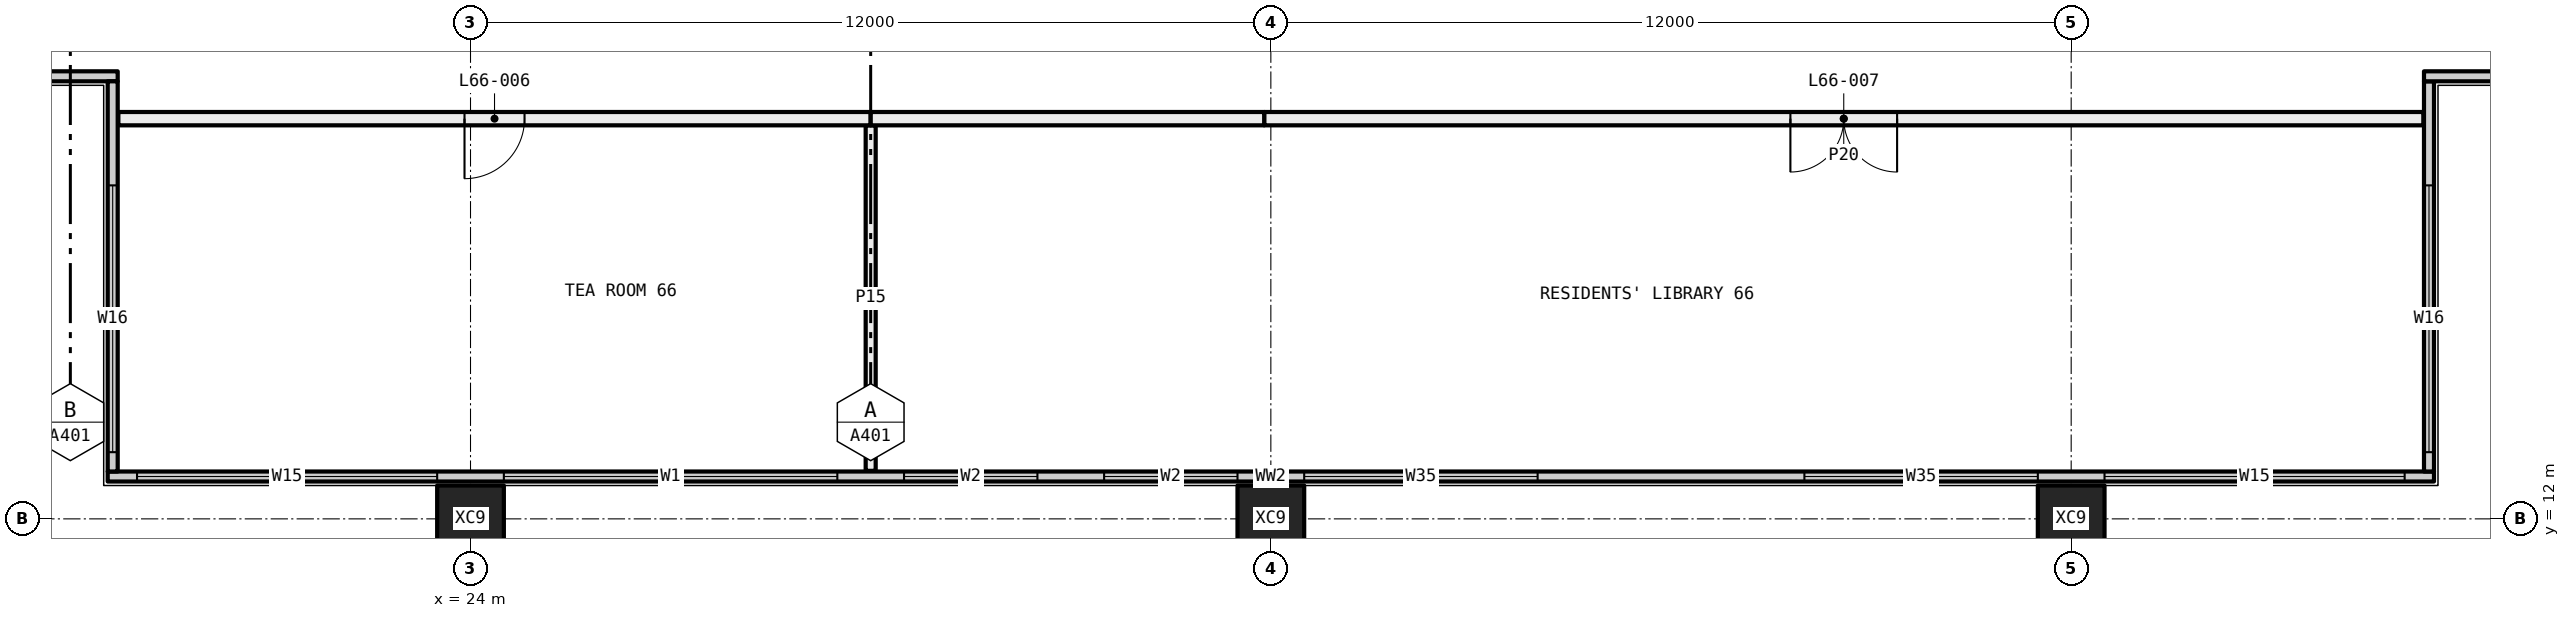
"""IFC4 building model, lengths in metres.
Left out: names, types, materials, properties, quantities, classifications, styles, units other than length and angle.
Written with IfcOpenShell. Run it as: python <this file> out.ifc"""

import sys

from ifc_helpers import new_model, si_unit, direction, frame, frame_2d, origin, origin_2d, place, context, subcontext, project, spatial, rectangle, hollow_rectangle, extrude, element, fill, save


model = new_model("IFC4")
c1 = context("Model", 3, precision=1e-05, world=origin(), true_north=direction((0.0, 1.0)))
c2 = subcontext(c1, "Body", "Model", "MODEL_VIEW")
j1 = project(units=[si_unit("LENGTHUNIT", "METRE"), si_unit("PLANEANGLEUNIT", "RADIAN")], contexts=[c1])
p1 = place(None, origin())
s1 = spatial("IfcSite", under=j1, at=p1, CompositionType="ELEMENT")
p2 = place(p1, origin())
s2 = spatial("IfcBuilding", under=s1, at=p2, CompositionType="ELEMENT")
p3 = place(p2, frame((0.0, 0.0, 245.55)))
s3 = spatial("IfcBuildingStorey", under=s2, at=p3, CompositionType="ELEMENT", Elevation=245.55)
for number, where, z_axis, x_axis in (
    (1, (24.0, 12.0, -0.4), (0.0, 0.0, 1.0), (1.0, 0.0, 0.0)),
    (2, (36.0, 12.0, -0.4), (0.0, 0.0, 1.0), (1.0, 0.0, 0.0)),
    (3, (48.0, 12.0, -0.4), (0.0, 0.0, 1.0), (1.0, 0.0, 0.0)),
):
    element("IfcColumn", number, at=place(p3, frame(where, z_axis=z_axis, x_axis=x_axis)), inside=s3, PredefinedType="COLUMN", context=c2, shape_type="SweptSolid", body=[
        extrude(hollow_rectangle(XDim=1.0, YDim=1.0, WallThickness=0.036, at=origin_2d()), origin(), (0.0, 0.0, 1.0), 3.45),
    ])
p4 = place(p3, frame((18.56, 12.635, 0.0), z_axis=(0.0, 0.0, 1.0), x_axis=(1.0, 0.0, 0.0)))
e4 = element("IfcWall", 4, at=p4, inside=s3, PredefinedType="ELEMENTEDWALL", context=c2, shape_type="SweptSolid", body=[
    extrude(rectangle(XDim=34.88, YDim=0.15, at=frame_2d((17.44, 0.0))), origin(), (0.0, 0.0, 1.0), 3.05),
])
p5 = place(p4, frame((0.44, 0.0, 0.45)))
e5 = element("IfcOpeningElement", 5, at=p5, cuts=e4, PredefinedType="OPENING", context=c2, shape_type="SweptSolid", body=[
    extrude(rectangle(XDim=4.5, YDim=2.55, at=frame_2d((2.25, 1.275))), frame((0.0, 0.085, 0.0), z_axis=(0.0, -1.0, 0.0), x_axis=(1.0, 0.0, 0.0)), (0.0, 0.0, 1.0), 0.17),
])
p6 = place(p4, frame((5.94, 0.0, 0.45)))
e6 = element("IfcOpeningElement", 6, at=p6, cuts=e4, PredefinedType="OPENING", context=c2, shape_type="SweptSolid", body=[
    extrude(rectangle(XDim=5.0, YDim=2.55, at=frame_2d((2.5, 1.275))), frame((0.0, 0.085, 0.0), z_axis=(0.0, -1.0, 0.0), x_axis=(1.0, 0.0, 0.0)), (0.0, 0.0, 1.0), 0.17),
])
p7 = place(p4, frame((11.94, 0.0, 0.45)))
e7 = element("IfcOpeningElement", 7, at=p7, cuts=e4, PredefinedType="OPENING", context=c2, shape_type="SweptSolid", body=[
    extrude(rectangle(XDim=2.0, YDim=2.55, at=frame_2d((1.0, 1.275))), frame((0.0, 0.085, 0.0), z_axis=(0.0, -1.0, 0.0), x_axis=(1.0, 0.0, 0.0)), (0.0, 0.0, 1.0), 0.17),
])
p8 = place(p4, frame((14.94, 0.0, 0.45)))
e8 = element("IfcOpeningElement", 8, at=p8, cuts=e4, PredefinedType="OPENING", context=c2, shape_type="SweptSolid", body=[
    extrude(rectangle(XDim=2.0, YDim=2.55, at=frame_2d((1.0, 1.275))), frame((0.0, 0.085, 0.0), z_axis=(0.0, -1.0, 0.0), x_axis=(1.0, 0.0, 0.0)), (0.0, 0.0, 1.0), 0.17),
])
p9 = place(p4, frame((17.94, 0.0, 0.45)))
e9 = element("IfcOpeningElement", 9, at=p9, cuts=e4, PredefinedType="OPENING", context=c2, shape_type="SweptSolid", body=[
    extrude(rectangle(XDim=3.5, YDim=2.55, at=frame_2d((1.75, 1.275))), frame((0.0, 0.085, 0.0), z_axis=(0.0, -1.0, 0.0), x_axis=(1.0, 0.0, 0.0)), (0.0, 0.0, 1.0), 0.17),
])
p10 = place(p4, frame((25.44, 0.0, 0.45)))
e10 = element("IfcOpeningElement", 10, at=p10, cuts=e4, PredefinedType="OPENING", context=c2, shape_type="SweptSolid", body=[
    extrude(rectangle(XDim=3.5, YDim=2.55, at=frame_2d((1.75, 1.275))), frame((0.0, 0.085, 0.0), z_axis=(0.0, -1.0, 0.0), x_axis=(1.0, 0.0, 0.0)), (0.0, 0.0, 1.0), 0.17),
])
p11 = place(p4, frame((29.94, 0.0, 0.45)))
e11 = element("IfcOpeningElement", 11, at=p11, cuts=e4, PredefinedType="OPENING", context=c2, shape_type="SweptSolid", body=[
    extrude(rectangle(XDim=4.5, YDim=2.55, at=frame_2d((2.25, 1.275))), frame((0.0, 0.085, 0.0), z_axis=(0.0, -1.0, 0.0), x_axis=(1.0, 0.0, 0.0)), (0.0, 0.0, 1.0), 0.17),
])
p12 = place(p3, frame((53.365, 12.71, 0.0), z_axis=(0.0, 0.0, 1.0), x_axis=(0.0, 1.0, 0.0)))
e12 = element("IfcWall", 12, at=p12, inside=s3, PredefinedType="ELEMENTEDWALL", context=c2, shape_type="SweptSolid", body=[
    extrude(rectangle(XDim=5.85, YDim=0.15, at=frame_2d((2.925, 0.0))), origin(), (0.0, 0.0, 1.0), 3.05),
])
p13 = place(p12, frame((0.29, 0.0, 0.45)))
e13 = element("IfcOpeningElement", 13, at=p13, cuts=e12, PredefinedType="OPENING", context=c2, shape_type="SweptSolid", body=[
    extrude(rectangle(XDim=4.0, YDim=2.55, at=frame_2d((2.0, 1.275))), frame((0.0, 0.085, 0.0), z_axis=(0.0, -1.0, 0.0), x_axis=(1.0, 0.0, 0.0)), (0.0, 0.0, 1.0), 0.17),
])
p14 = place(p3, frame((53.29, 18.635, 0.0), z_axis=(0.0, 0.0, 1.0), x_axis=(1.0, 0.0, 0.0)))
e14 = element("IfcWall", 14, at=p14, inside=s3, PredefinedType="ELEMENTEDWALL", context=c2, shape_type="SweptSolid", body=[
    extrude(rectangle(XDim=6.15, YDim=0.15, at=frame_2d((3.075, 0.0))), origin(), (0.0, 0.0, 1.0), 3.05),
])
p15 = place(p14, frame((1.71, 0.0, 0.45)))
e15 = element("IfcOpeningElement", 15, at=p15, cuts=e14, PredefinedType="OPENING", context=c2, shape_type="SweptSolid", body=[
    extrude(rectangle(XDim=4.0, YDim=2.55, at=frame_2d((2.0, 1.275))), frame((0.0, 0.085, 0.0), z_axis=(0.0, -1.0, 0.0), x_axis=(1.0, 0.0, 0.0)), (0.0, 0.0, 1.0), 0.17),
])
p16 = place(p3, frame((12.56, 18.635, 0.0), z_axis=(0.0, 0.0, 1.0), x_axis=(1.0, 0.0, 0.0)))
e16 = element("IfcWall", 16, at=p16, inside=s3, PredefinedType="ELEMENTEDWALL", context=c2, shape_type="SweptSolid", body=[
    extrude(rectangle(XDim=6.15, YDim=0.15, at=frame_2d((3.075, 0.0))), origin(), (0.0, 0.0, 1.0), 3.05),
])
p17 = place(p16, frame((0.44, 0.0, 0.45)))
e17 = element("IfcOpeningElement", 17, at=p17, cuts=e16, PredefinedType="OPENING", context=c2, shape_type="SweptSolid", body=[
    extrude(rectangle(XDim=4.0, YDim=2.55, at=frame_2d((2.0, 1.275))), frame((0.0, 0.085, 0.0), z_axis=(0.0, -1.0, 0.0), x_axis=(1.0, 0.0, 0.0)), (0.0, 0.0, 1.0), 0.17),
])
p18 = place(p3, frame((18.635, 12.71, 0.0), z_axis=(0.0, 0.0, 1.0), x_axis=(0.0, 1.0, 0.0)))
e18 = element("IfcWall", 18, at=p18, inside=s3, PredefinedType="ELEMENTEDWALL", context=c2, shape_type="SweptSolid", body=[
    extrude(rectangle(XDim=5.85, YDim=0.15, at=frame_2d((2.925, 0.0))), origin(), (0.0, 0.0, 1.0), 3.05),
])
p19 = place(p18, frame((0.29, 0.0, 0.45)))
e19 = element("IfcOpeningElement", 19, at=p19, cuts=e18, PredefinedType="OPENING", context=c2, shape_type="SweptSolid", body=[
    extrude(rectangle(XDim=4.0, YDim=2.55, at=frame_2d((2.0, 1.275))), frame((0.0, 0.085, 0.0), z_axis=(0.0, -1.0, 0.0), x_axis=(1.0, 0.0, 0.0)), (0.0, 0.0, 1.0), 0.17),
])
p20 = place(p3, frame((30.0, 12.72, 0.0), z_axis=(0.0, 0.0, 1.0), x_axis=(0.0, 1.0, 0.0)))
e20 = element("IfcWall", 20, at=p20, inside=s3, PredefinedType="PARTITIONING", context=c2, shape_type="SweptSolid", body=[
    extrude(rectangle(XDim=5.18, YDim=0.15, at=frame_2d((2.59, 0.0))), origin(), (0.0, 0.0, 1.0), 3.05),
])
p21 = place(p3, frame((30.0, 18.0, 0.0), z_axis=(0.0, 0.0, 1.0), x_axis=(-1.0, 0.0, 0.0)))
e21 = element("IfcWall", 21, at=p21, inside=s3, PredefinedType="PARTITIONING", context=c2, shape_type="SweptSolid", body=[
    extrude(rectangle(XDim=11.28, YDim=0.2, at=frame_2d((5.64, 0.0))), origin(), (0.0, 0.0, 1.0), 3.05),
])
p22 = place(p21, frame((5.19, 0.0, 0.0)))
e22 = element("IfcOpeningElement", 22, at=p22, cuts=e21, PredefinedType="OPENING", context=c2, shape_type="SweptSolid", body=[
    extrude(rectangle(XDim=0.9, YDim=2.1, at=frame_2d((0.45, 1.05))), frame((0.0, 0.11, 0.0), z_axis=(0.0, -1.0, 0.0), x_axis=(1.0, 0.0, 0.0)), (0.0, 0.0, 1.0), 0.22),
])
p23 = place(p3, frame((53.28, 18.0, 0.0), z_axis=(0.0, 0.0, 1.0), x_axis=(-1.0, 0.0, 0.0)))
e23 = element("IfcWall", 23, at=p23, inside=s3, PredefinedType="PARTITIONING", context=c2, shape_type="SweptSolid", body=[
    extrude(rectangle(XDim=17.38, YDim=0.2, at=frame_2d((8.69, 0.0))), origin(), (0.0, 0.0, 1.0), 2.45),
])
p24 = place(p23, frame((7.89, 0.0, 0.0)))
e24 = element("IfcOpeningElement", 24, at=p24, cuts=e23, PredefinedType="OPENING", context=c2, shape_type="SweptSolid", body=[
    extrude(rectangle(XDim=1.6, YDim=2.1, at=frame_2d((0.8, 1.05))), frame((0.0, 0.11, 0.0), z_axis=(0.0, -1.0, 0.0), x_axis=(1.0, 0.0, 0.0)), (0.0, 0.0, 1.0), 0.22),
])
p25 = place(p3, frame((35.9, 18.0, 0.0), z_axis=(0.0, 0.0, 1.0), x_axis=(-1.0, 0.0, 0.0)))
e25 = element("IfcWall", 25, at=p25, inside=s3, PredefinedType="PARTITIONING", context=c2, shape_type="SweptSolid", body=[
    extrude(rectangle(XDim=5.9, YDim=0.2, at=frame_2d((2.95, 0.0))), origin(), (0.0, 0.0, 1.0), 3.05),
])
p26 = place(p5, origin())
e26 = element("IfcWindow", 26, at=p26, inside=s3, PartitioningType="SINGLE_PANEL", PredefinedType="WINDOW", context=c2, shape_type="SweptSolid", body=[
    extrude(rectangle(XDim=4.5, YDim=2.55, at=frame_2d((2.25, 1.275))), frame((0.0, 0.03, 0.0), z_axis=(0.0, -1.0, 0.0), x_axis=(1.0, 0.0, 0.0)), (0.0, 0.0, 1.0), 0.06),
])
fill(e5, e26)
p27 = place(p6, origin())
e27 = element("IfcWindow", 27, at=p27, inside=s3, PartitioningType="SINGLE_PANEL", PredefinedType="WINDOW", context=c2, shape_type="SweptSolid", body=[
    extrude(rectangle(XDim=5.0, YDim=2.55, at=frame_2d((2.5, 1.275))), frame((0.0, 0.03, 0.0), z_axis=(0.0, -1.0, 0.0), x_axis=(1.0, 0.0, 0.0)), (0.0, 0.0, 1.0), 0.06),
])
fill(e6, e27)
p28 = place(p7, origin())
e28 = element("IfcWindow", 28, at=p28, inside=s3, PartitioningType="SINGLE_PANEL", PredefinedType="WINDOW", context=c2, shape_type="SweptSolid", body=[
    extrude(rectangle(XDim=2.0, YDim=2.55, at=frame_2d((1.0, 1.275))), frame((0.0, 0.03, 0.0), z_axis=(0.0, -1.0, 0.0), x_axis=(1.0, 0.0, 0.0)), (0.0, 0.0, 1.0), 0.06),
])
fill(e7, e28)
p29 = place(p8, origin())
e29 = element("IfcWindow", 29, at=p29, inside=s3, PartitioningType="SINGLE_PANEL", PredefinedType="WINDOW", context=c2, shape_type="SweptSolid", body=[
    extrude(rectangle(XDim=2.0, YDim=2.55, at=frame_2d((1.0, 1.275))), frame((0.0, 0.03, 0.0), z_axis=(0.0, -1.0, 0.0), x_axis=(1.0, 0.0, 0.0)), (0.0, 0.0, 1.0), 0.06),
])
fill(e8, e29)
p30 = place(p9, origin())
e30 = element("IfcWindow", 30, at=p30, inside=s3, PartitioningType="SINGLE_PANEL", PredefinedType="WINDOW", context=c2, shape_type="SweptSolid", body=[
    extrude(rectangle(XDim=3.5, YDim=2.55, at=frame_2d((1.75, 1.275))), frame((0.0, 0.03, 0.0), z_axis=(0.0, -1.0, 0.0), x_axis=(1.0, 0.0, 0.0)), (0.0, 0.0, 1.0), 0.06),
])
fill(e9, e30)
p31 = place(p10, origin())
e31 = element("IfcWindow", 31, at=p31, inside=s3, PartitioningType="SINGLE_PANEL", PredefinedType="WINDOW", context=c2, shape_type="SweptSolid", body=[
    extrude(rectangle(XDim=3.5, YDim=2.55, at=frame_2d((1.75, 1.275))), frame((0.0, 0.03, 0.0), z_axis=(0.0, -1.0, 0.0), x_axis=(1.0, 0.0, 0.0)), (0.0, 0.0, 1.0), 0.06),
])
fill(e10, e31)
p32 = place(p11, origin())
e32 = element("IfcWindow", 32, at=p32, inside=s3, PartitioningType="SINGLE_PANEL", PredefinedType="WINDOW", context=c2, shape_type="SweptSolid", body=[
    extrude(rectangle(XDim=4.5, YDim=2.55, at=frame_2d((2.25, 1.275))), frame((0.0, 0.03, 0.0), z_axis=(0.0, -1.0, 0.0), x_axis=(1.0, 0.0, 0.0)), (0.0, 0.0, 1.0), 0.06),
])
fill(e11, e32)
p33 = place(p13, origin())
e33 = element("IfcWindow", 33, at=p33, inside=s3, PartitioningType="SINGLE_PANEL", PredefinedType="WINDOW", context=c2, shape_type="SweptSolid", body=[
    extrude(rectangle(XDim=4.0, YDim=2.55, at=frame_2d((2.0, 1.275))), frame((0.0, 0.03, 0.0), z_axis=(0.0, -1.0, 0.0), x_axis=(1.0, 0.0, 0.0)), (0.0, 0.0, 1.0), 0.06),
])
fill(e13, e33)
p34 = place(p19, origin())
e34 = element("IfcWindow", 34, at=p34, inside=s3, PartitioningType="SINGLE_PANEL", PredefinedType="WINDOW", context=c2, shape_type="SweptSolid", body=[
    extrude(rectangle(XDim=4.0, YDim=2.55, at=frame_2d((2.0, 1.275))), frame((0.0, 0.03, 0.0), z_axis=(0.0, -1.0, 0.0), x_axis=(1.0, 0.0, 0.0)), (0.0, 0.0, 1.0), 0.06),
])
fill(e19, e34)
p35 = place(p22, origin())
e35 = element("IfcDoor", 35, at=p35, inside=s3, OperationType="SINGLE_SWING_LEFT", PredefinedType="DOOR", context=c2, shape_type="SweptSolid", body=[
    extrude(rectangle(XDim=0.9, YDim=2.1, at=frame_2d((0.45, 1.05))), frame((0.0, 0.025, 0.0), z_axis=(0.0, -1.0, 0.0), x_axis=(1.0, 0.0, 0.0)), (0.0, 0.0, 1.0), 0.05),
])
fill(e22, e35)
p36 = place(p24, origin())
e36 = element("IfcDoor", 36, at=p36, inside=s3, OperationType="DOUBLE_DOOR_SINGLE_SWING", PredefinedType="DOOR", context=c2, shape_type="SweptSolid", body=[
    extrude(rectangle(XDim=1.6, YDim=2.1, at=frame_2d((0.8, 1.05))), frame((0.0, 0.025, 0.0), z_axis=(0.0, -1.0, 0.0), x_axis=(1.0, 0.0, 0.0)), (0.0, 0.0, 1.0), 0.05),
])
fill(e24, e36)
save(model, sys.argv[1])
